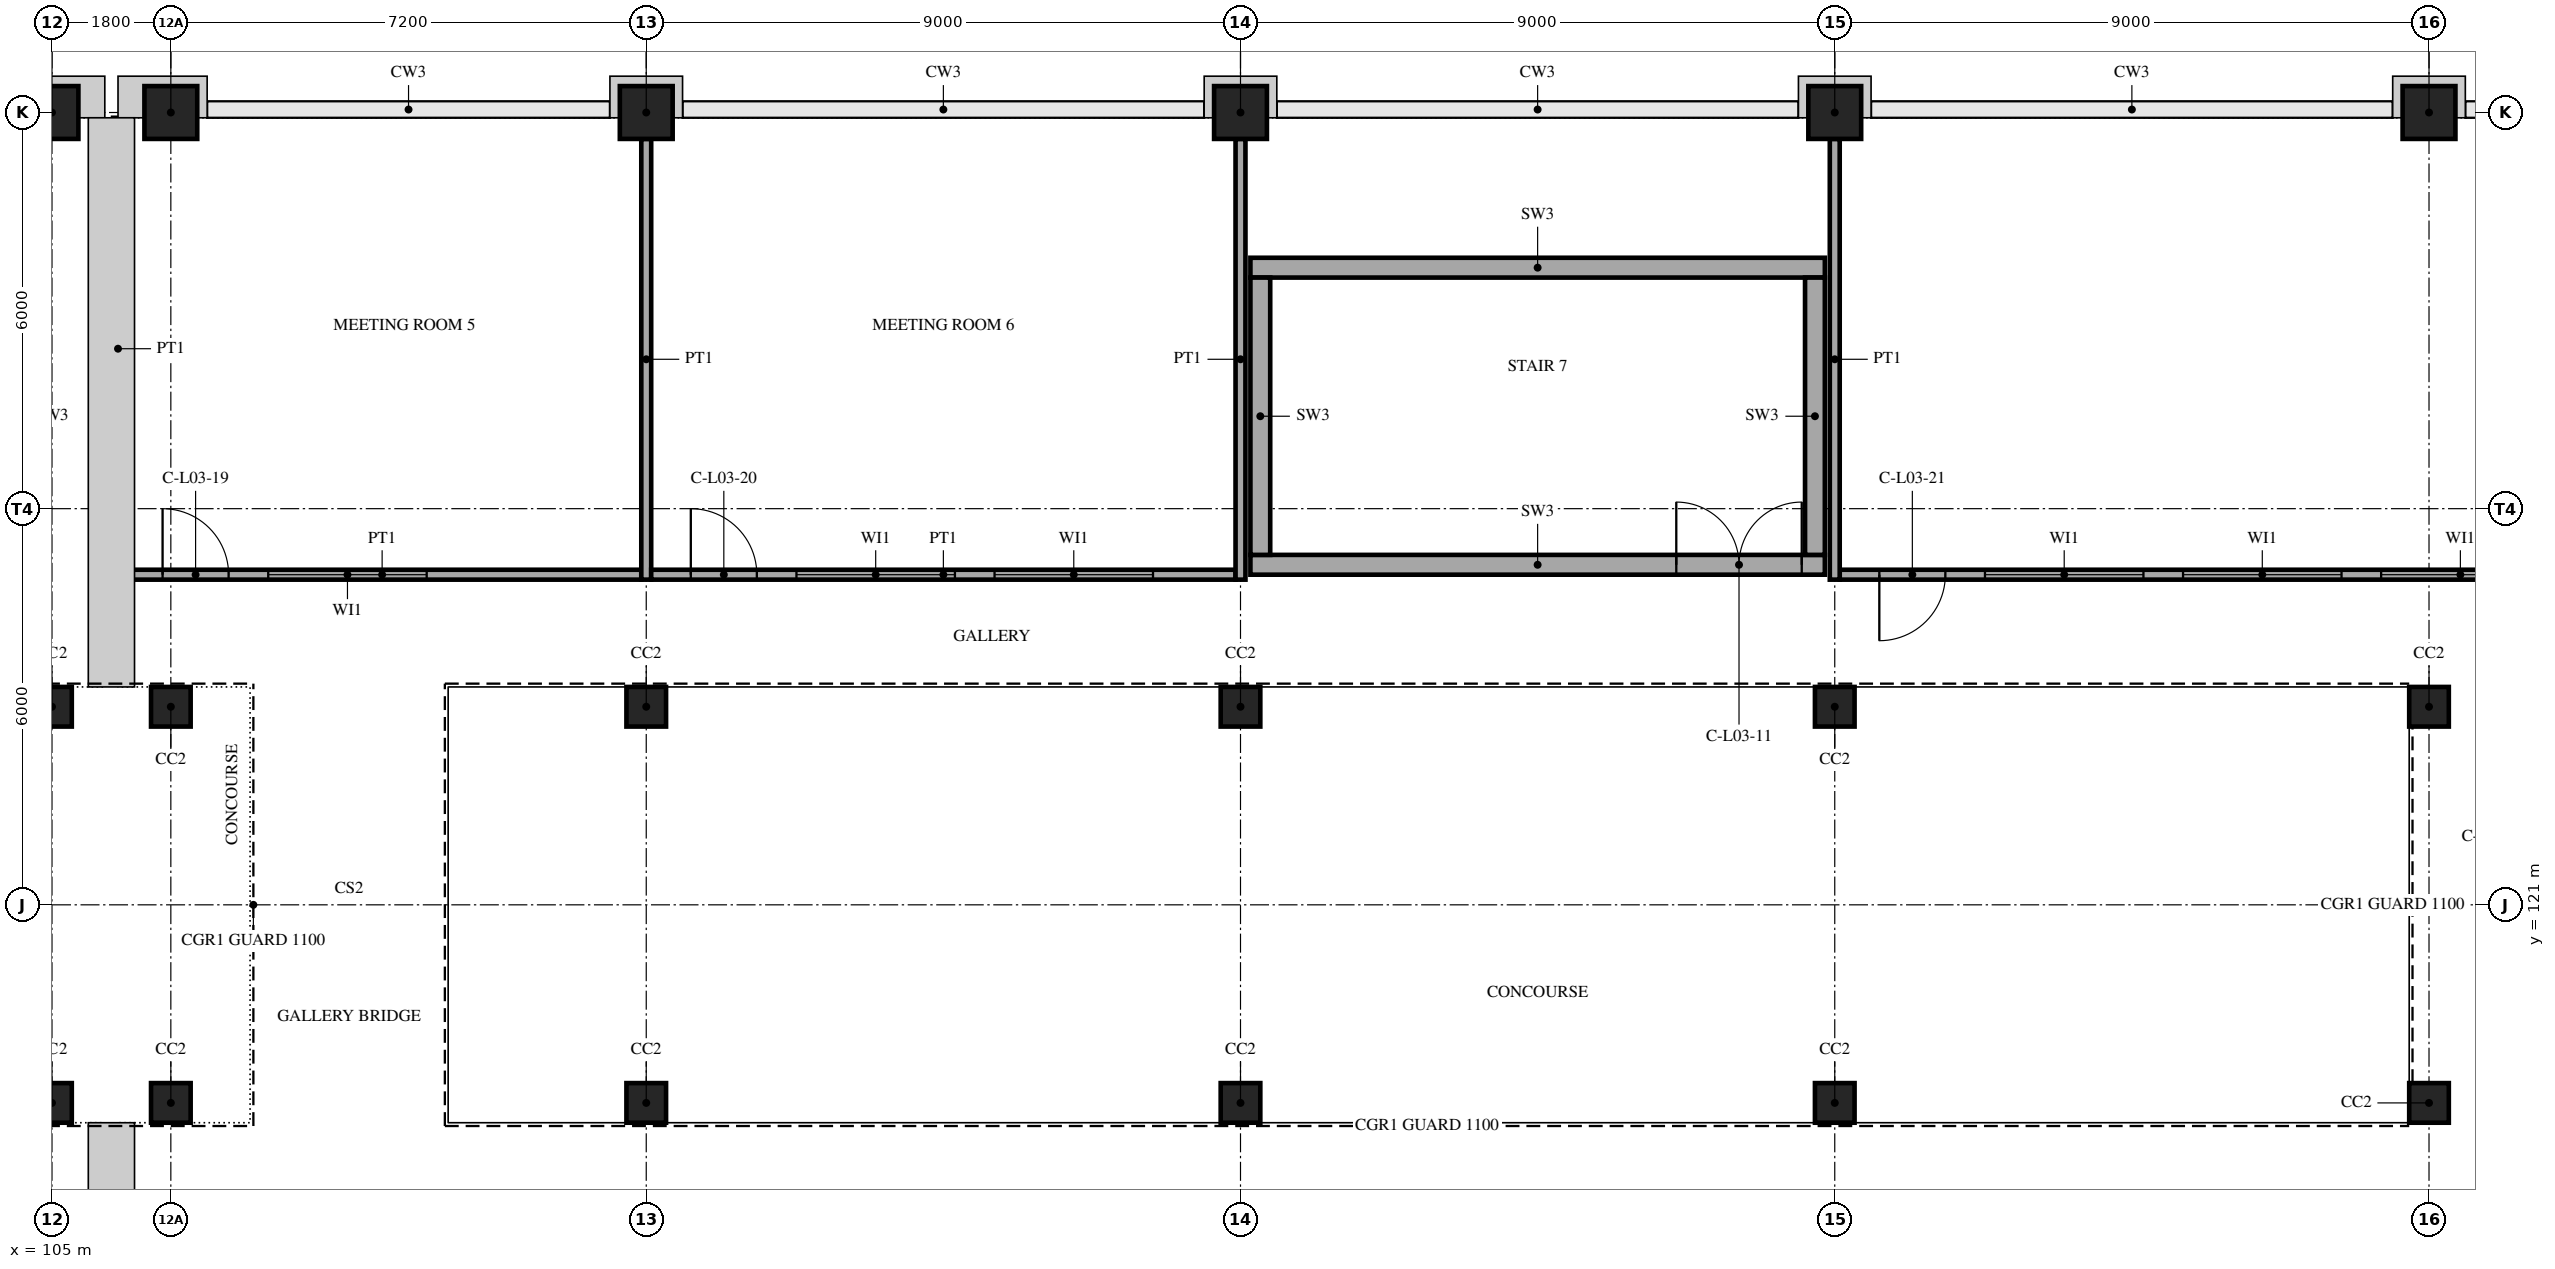
"""IFC4 building model, lengths in metres.
Left out: names, types, materials, properties, quantities, classifications, styles, units other than length and angle.
Written with IfcOpenShell. Run it as: python <this file> out.ifc"""

import sys

from ifc_helpers import new_model, si_unit, direction, frame, frame_2d, origin, origin_2d, place, context, subcontext, project, spatial, rectangle, extrude, element, fill, save


model = new_model("IFC4")
c1 = context("Model", 3, precision=1e-05, world=origin(), true_north=direction((0.0, 1.0)))
c2 = subcontext(c1, "Body", "Model", "MODEL_VIEW")
j1 = project(units=[si_unit("LENGTHUNIT", "METRE"), si_unit("PLANEANGLEUNIT", "RADIAN")], contexts=[c1])
p1 = place(None, origin())
s1 = spatial("IfcSite", under=j1, at=p1, CompositionType="ELEMENT")
p2 = place(p1, origin())
s2 = spatial("IfcBuilding", under=s1, at=p2, CompositionType="ELEMENT")
p3 = place(p2, frame((0.0, 0.0, 15.0)))
s3 = spatial("IfcBuildingStorey", under=s2, at=p3, CompositionType="ELEMENT", Elevation=15.0)
for number, where, z_axis, x_axis in (
    (1, (105.0, 118.0, 0.0), (0.0, 0.0, 1.0), (1.0, 0.0, 0.0)),
    (2, (105.0, 124.0, 0.0), (0.0, 0.0, 1.0), (1.0, 0.0, 0.0)),
):
    element("IfcColumn", number, at=place(p3, frame(where, z_axis=z_axis, x_axis=x_axis)), inside=s3, PredefinedType="COLUMN", context=c2, shape_type="SweptSolid", body=[
        extrude(rectangle(XDim=0.6, YDim=0.6, at=origin_2d()), origin(), (0.0, 0.0, 1.0), 4.2),
    ])
p4 = place(p3, frame((105.0, 133.0, 0.0), z_axis=(0.0, 0.0, 1.0), x_axis=(1.0, 0.0, 0.0)))
e3 = element("IfcColumn", 3, at=p4, inside=s3, PredefinedType="COLUMN", context=c2, shape_type="SweptSolid", body=[
    extrude(rectangle(XDim=0.8, YDim=0.8, at=origin_2d()), origin(), (0.0, 0.0, 1.0), 4.2),
])
for number, where, z_axis, x_axis in (
    (4, (106.8, 118.0, 0.0), (0.0, 0.0, 1.0), (1.0, 0.0, 0.0)),
    (5, (106.8, 124.0, 0.0), (0.0, 0.0, 1.0), (1.0, 0.0, 0.0)),
):
    element("IfcColumn", number, at=place(p3, frame(where, z_axis=z_axis, x_axis=x_axis)), inside=s3, PredefinedType="COLUMN", context=c2, shape_type="SweptSolid", body=[
        extrude(rectangle(XDim=0.6, YDim=0.6, at=origin_2d()), origin(), (0.0, 0.0, 1.0), 4.2),
    ])
p5 = place(p3, frame((106.8, 133.0, 0.0), z_axis=(0.0, 0.0, 1.0), x_axis=(1.0, 0.0, 0.0)))
e6 = element("IfcColumn", 6, at=p5, inside=s3, PredefinedType="COLUMN", context=c2, shape_type="SweptSolid", body=[
    extrude(rectangle(XDim=0.8, YDim=0.8, at=origin_2d()), origin(), (0.0, 0.0, 1.0), 4.2),
])
for number, where, z_axis, x_axis in (
    (7, (114.0, 118.0, 0.0), (0.0, 0.0, 1.0), (1.0, 0.0, 0.0)),
    (8, (114.0, 124.0, 0.0), (0.0, 0.0, 1.0), (1.0, 0.0, 0.0)),
):
    element("IfcColumn", number, at=place(p3, frame(where, z_axis=z_axis, x_axis=x_axis)), inside=s3, PredefinedType="COLUMN", context=c2, shape_type="SweptSolid", body=[
        extrude(rectangle(XDim=0.6, YDim=0.6, at=origin_2d()), origin(), (0.0, 0.0, 1.0), 4.2),
    ])
p6 = place(p3, frame((114.0, 133.0, 0.0), z_axis=(0.0, 0.0, 1.0), x_axis=(1.0, 0.0, 0.0)))
e9 = element("IfcColumn", 9, at=p6, inside=s3, PredefinedType="COLUMN", context=c2, shape_type="SweptSolid", body=[
    extrude(rectangle(XDim=0.8, YDim=0.8, at=origin_2d()), origin(), (0.0, 0.0, 1.0), 4.2),
])
for number, where, z_axis, x_axis in (
    (10, (123.0, 118.0, 0.0), (0.0, 0.0, 1.0), (1.0, 0.0, 0.0)),
    (11, (123.0, 124.0, 0.0), (0.0, 0.0, 1.0), (1.0, 0.0, 0.0)),
):
    element("IfcColumn", number, at=place(p3, frame(where, z_axis=z_axis, x_axis=x_axis)), inside=s3, PredefinedType="COLUMN", context=c2, shape_type="SweptSolid", body=[
        extrude(rectangle(XDim=0.6, YDim=0.6, at=origin_2d()), origin(), (0.0, 0.0, 1.0), 4.2),
    ])
p7 = place(p3, frame((123.0, 133.0, 0.0), z_axis=(0.0, 0.0, 1.0), x_axis=(1.0, 0.0, 0.0)))
e12 = element("IfcColumn", 12, at=p7, inside=s3, PredefinedType="COLUMN", context=c2, shape_type="SweptSolid", body=[
    extrude(rectangle(XDim=0.8, YDim=0.8, at=origin_2d()), origin(), (0.0, 0.0, 1.0), 4.2),
])
for number, where, z_axis, x_axis in (
    (13, (132.0, 118.0, 0.0), (0.0, 0.0, 1.0), (1.0, 0.0, 0.0)),
    (14, (132.0, 124.0, 0.0), (0.0, 0.0, 1.0), (1.0, 0.0, 0.0)),
):
    element("IfcColumn", number, at=place(p3, frame(where, z_axis=z_axis, x_axis=x_axis)), inside=s3, PredefinedType="COLUMN", context=c2, shape_type="SweptSolid", body=[
        extrude(rectangle(XDim=0.6, YDim=0.6, at=origin_2d()), origin(), (0.0, 0.0, 1.0), 4.2),
    ])
p8 = place(p3, frame((132.0, 133.0, 0.0), z_axis=(0.0, 0.0, 1.0), x_axis=(1.0, 0.0, 0.0)))
e15 = element("IfcColumn", 15, at=p8, inside=s3, PredefinedType="COLUMN", context=c2, shape_type="SweptSolid", body=[
    extrude(rectangle(XDim=0.8, YDim=0.8, at=origin_2d()), origin(), (0.0, 0.0, 1.0), 4.2),
])
for number, where, z_axis, x_axis in (
    (16, (141.0, 118.0, 0.0), (0.0, 0.0, 1.0), (1.0, 0.0, 0.0)),
    (17, (141.0, 124.0, 0.0), (0.0, 0.0, 1.0), (1.0, 0.0, 0.0)),
):
    element("IfcColumn", number, at=place(p3, frame(where, z_axis=z_axis, x_axis=x_axis)), inside=s3, PredefinedType="COLUMN", context=c2, shape_type="SweptSolid", body=[
        extrude(rectangle(XDim=0.6, YDim=0.6, at=origin_2d()), origin(), (0.0, 0.0, 1.0), 4.2),
    ])
p9 = place(p3, frame((141.0, 133.0, 0.0), z_axis=(0.0, 0.0, 1.0), x_axis=(1.0, 0.0, 0.0)))
e18 = element("IfcColumn", 18, at=p9, inside=s3, PredefinedType="COLUMN", context=c2, shape_type="SweptSolid", body=[
    extrude(rectangle(XDim=0.8, YDim=0.8, at=origin_2d()), origin(), (0.0, 0.0, 1.0), 4.2),
])
p10 = place(p3, frame((123.15, 126.15, 0.0), z_axis=(0.0, 0.0, 1.0), x_axis=(1.0, 0.0, 0.0)))
e19 = element("IfcWall", 19, at=p10, inside=s3, PredefinedType="SHEAR", context=c2, shape_type="SweptSolid", body=[
    extrude(rectangle(XDim=8.7, YDim=0.3, at=frame_2d((4.35, 0.0))), origin(), (0.0, 0.0, 1.0), 4.2),
])
p11 = place(p10, frame((6.45, 0.0, 0.0)))
e20 = element("IfcOpeningElement", 20, at=p11, cuts=e19, PredefinedType="OPENING", context=c2, shape_type="SweptSolid", body=[
    extrude(rectangle(XDim=1.9, YDim=2.1, at=frame_2d((0.95, 1.05))), frame((0.0, 0.16, 0.0), z_axis=(0.0, -1.0, 0.0), x_axis=(1.0, 0.0, 0.0)), (0.0, 0.0, 1.0), 0.32),
])
p12 = place(p3, frame((123.15, 130.65, 0.0), z_axis=(0.0, 0.0, 1.0), x_axis=(1.0, 0.0, 0.0)))
e21 = element("IfcWall", 21, at=p12, inside=s3, PredefinedType="SHEAR", context=c2, shape_type="SweptSolid", body=[
    extrude(rectangle(XDim=8.7, YDim=0.3, at=frame_2d((4.35, 0.0))), origin(), (0.0, 0.0, 1.0), 4.2),
])
for number, where, z_axis, x_axis in (
    (22, (123.3, 126.3, 0.0), (0.0, 0.0, 1.0), (0.0, 1.0, 0.0)),
    (23, (131.7, 126.3, 0.0), (0.0, 0.0, 1.0), (0.0, 1.0, 0.0)),
):
    element("IfcWall", number, at=place(p3, frame(where, z_axis=z_axis, x_axis=x_axis)), inside=s3, PredefinedType="SHEAR", context=c2, shape_type="SweptSolid", body=[
        extrude(rectangle(XDim=4.2, YDim=0.3, at=frame_2d((2.1, 0.0))), origin(), (0.0, 0.0, 1.0), 4.2),
    ])
p13 = place(p3, frame((106.075, 126.0, 0.0), z_axis=(0.0, 0.0, 1.0), x_axis=(1.0, 0.0, 0.0)))
e24 = element("IfcWall", 24, at=p13, inside=s3, PredefinedType="PARTITIONING", context=c2, shape_type="SweptSolid", body=[
    extrude(rectangle(XDim=7.85, YDim=0.15, at=frame_2d((3.925, 0.0))), origin(), (0.0, 0.0, 1.0), 4.2),
])
p14 = place(p13, frame((0.6, 0.0, 0.0)))
e25 = element("IfcOpeningElement", 25, at=p14, cuts=e24, PredefinedType="OPENING", context=c2, shape_type="SweptSolid", body=[
    extrude(rectangle(XDim=1.0, YDim=2.1, at=frame_2d((0.5, 1.05))), frame((0.0, 0.085, 0.0), z_axis=(0.0, -1.0, 0.0), x_axis=(1.0, 0.0, 0.0)), (0.0, 0.0, 1.0), 0.17),
])
p15 = place(p13, frame((2.2, 0.0, 0.9)))
e26 = element("IfcOpeningElement", 26, at=p15, cuts=e24, PredefinedType="OPENING", context=c2, shape_type="SweptSolid", body=[
    extrude(rectangle(XDim=2.4, YDim=1.5, at=frame_2d((1.2, 0.75))), frame((0.0, 0.085, 0.0), z_axis=(0.0, -1.0, 0.0), x_axis=(1.0, 0.0, 0.0)), (0.0, 0.0, 1.0), 0.17),
])
p16 = place(p3, frame((106.0, 125.925, 0.0), z_axis=(0.0, 0.0, 1.0), x_axis=(0.0, 1.0, 0.0)))
e27 = element("IfcWall", 27, at=p16, inside=s3, PredefinedType="PARTITIONING", context=c2, shape_type="SweptSolid", body=[
    extrude(rectangle(XDim=6.995, YDim=0.15, at=frame_2d((3.498, 0.0))), origin(), (0.0, 0.0, 1.0), 4.2),
])
p17 = place(p3, frame((114.0, 125.925, 0.0), z_axis=(0.0, 0.0, 1.0), x_axis=(0.0, 1.0, 0.0)))
e28 = element("IfcWall", 28, at=p17, inside=s3, PredefinedType="PARTITIONING", context=c2, shape_type="SweptSolid", body=[
    extrude(rectangle(XDim=6.675, YDim=0.15, at=frame_2d((3.337, 0.0))), origin(), (0.0, 0.0, 1.0), 4.2),
])
p18 = place(p3, frame((114.075, 126.0, 0.0), z_axis=(0.0, 0.0, 1.0), x_axis=(1.0, 0.0, 0.0)))
e29 = element("IfcWall", 29, at=p18, inside=s3, PredefinedType="PARTITIONING", context=c2, shape_type="SweptSolid", body=[
    extrude(rectangle(XDim=8.85, YDim=0.15, at=frame_2d((4.425, 0.0))), origin(), (0.0, 0.0, 1.0), 4.2),
])
p19 = place(p18, frame((0.6, 0.0, 0.0)))
e30 = element("IfcOpeningElement", 30, at=p19, cuts=e29, PredefinedType="OPENING", context=c2, shape_type="SweptSolid", body=[
    extrude(rectangle(XDim=1.0, YDim=2.1, at=frame_2d((0.5, 1.05))), frame((0.0, 0.085, 0.0), z_axis=(0.0, -1.0, 0.0), x_axis=(1.0, 0.0, 0.0)), (0.0, 0.0, 1.0), 0.17),
])
p20 = place(p18, frame((2.2, 0.0, 0.9)))
e31 = element("IfcOpeningElement", 31, at=p20, cuts=e29, PredefinedType="OPENING", context=c2, shape_type="SweptSolid", body=[
    extrude(rectangle(XDim=2.4, YDim=1.5, at=frame_2d((1.2, 0.75))), frame((0.0, 0.085, 0.0), z_axis=(0.0, -1.0, 0.0), x_axis=(1.0, 0.0, 0.0)), (0.0, 0.0, 1.0), 0.17),
])
p21 = place(p18, frame((5.2, 0.0, 0.9)))
e32 = element("IfcOpeningElement", 32, at=p21, cuts=e29, PredefinedType="OPENING", context=c2, shape_type="SweptSolid", body=[
    extrude(rectangle(XDim=2.4, YDim=1.5, at=frame_2d((1.2, 0.75))), frame((0.0, 0.085, 0.0), z_axis=(0.0, -1.0, 0.0), x_axis=(1.0, 0.0, 0.0)), (0.0, 0.0, 1.0), 0.17),
])
p22 = place(p3, frame((123.0, 125.925, 0.0), z_axis=(0.0, 0.0, 1.0), x_axis=(0.0, 1.0, 0.0)))
e33 = element("IfcWall", 33, at=p22, inside=s3, PredefinedType="PARTITIONING", context=c2, shape_type="SweptSolid", body=[
    extrude(rectangle(XDim=6.675, YDim=0.15, at=frame_2d((3.337, 0.0))), origin(), (0.0, 0.0, 1.0), 4.2),
])
p23 = place(p3, frame((132.075, 126.0, 0.0), z_axis=(0.0, 0.0, 1.0), x_axis=(1.0, 0.0, 0.0)))
e34 = element("IfcWall", 34, at=p23, inside=s3, PredefinedType="PARTITIONING", context=c2, shape_type="SweptSolid", body=[
    extrude(rectangle(XDim=26.85, YDim=0.15, at=frame_2d((13.425, 0.0))), origin(), (0.0, 0.0, 1.0), 4.2),
])
p24 = place(p23, frame((0.6, 0.0, 0.0)))
e35 = element("IfcOpeningElement", 35, at=p24, cuts=e34, PredefinedType="OPENING", context=c2, shape_type="SweptSolid", body=[
    extrude(rectangle(XDim=1.0, YDim=2.1, at=frame_2d((0.5, 1.05))), frame((0.0, 0.085, 0.0), z_axis=(0.0, -1.0, 0.0), x_axis=(1.0, 0.0, 0.0)), (0.0, 0.0, 1.0), 0.17),
])
p25 = place(p23, frame((2.2, 0.0, 0.9)))
e36 = element("IfcOpeningElement", 36, at=p25, cuts=e34, PredefinedType="OPENING", context=c2, shape_type="SweptSolid", body=[
    extrude(rectangle(XDim=2.4, YDim=1.5, at=frame_2d((1.2, 0.75))), frame((0.0, 0.085, 0.0), z_axis=(0.0, -1.0, 0.0), x_axis=(1.0, 0.0, 0.0)), (0.0, 0.0, 1.0), 0.17),
])
p26 = place(p23, frame((5.2, 0.0, 0.9)))
e37 = element("IfcOpeningElement", 37, at=p26, cuts=e34, PredefinedType="OPENING", context=c2, shape_type="SweptSolid", body=[
    extrude(rectangle(XDim=2.4, YDim=1.5, at=frame_2d((1.2, 0.75))), frame((0.0, 0.085, 0.0), z_axis=(0.0, -1.0, 0.0), x_axis=(1.0, 0.0, 0.0)), (0.0, 0.0, 1.0), 0.17),
])
p27 = place(p23, frame((8.2, 0.0, 0.9)))
e38 = element("IfcOpeningElement", 38, at=p27, cuts=e34, PredefinedType="OPENING", context=c2, shape_type="SweptSolid", body=[
    extrude(rectangle(XDim=2.4, YDim=1.5, at=frame_2d((1.2, 0.75))), frame((0.0, 0.085, 0.0), z_axis=(0.0, -1.0, 0.0), x_axis=(1.0, 0.0, 0.0)), (0.0, 0.0, 1.0), 0.17),
])
p28 = place(p3, frame((132.0, 125.925, 0.0), z_axis=(0.0, 0.0, 1.0), x_axis=(0.0, 1.0, 0.0)))
e39 = element("IfcWall", 39, at=p28, inside=s3, PredefinedType="PARTITIONING", context=c2, shape_type="SweptSolid", body=[
    extrude(rectangle(XDim=6.675, YDim=0.15, at=frame_2d((3.337, 0.0))), origin(), (0.0, 0.0, 1.0), 4.2),
])
p29 = place(p11, origin())
e40 = element("IfcDoor", 40, at=p29, inside=s3, OperationType="DOUBLE_DOOR_SINGLE_SWING", PredefinedType="NOTDEFINED", context=c2, shape_type="SweptSolid", body=[
    extrude(rectangle(XDim=1.9, YDim=2.1, at=frame_2d((0.95, 1.05))), frame((0.0, 0.025, 0.0), z_axis=(0.0, -1.0, 0.0), x_axis=(1.0, 0.0, 0.0)), (0.0, 0.0, 1.0), 0.05),
])
fill(e20, e40)
p30 = place(p14, origin())
e41 = element("IfcDoor", 41, at=p30, inside=s3, OperationType="SINGLE_SWING_LEFT", PredefinedType="NOTDEFINED", context=c2, shape_type="SweptSolid", body=[
    extrude(rectangle(XDim=1.0, YDim=2.1, at=frame_2d((0.5, 1.05))), frame((0.0, 0.025, 0.0), z_axis=(0.0, -1.0, 0.0), x_axis=(1.0, 0.0, 0.0)), (0.0, 0.0, 1.0), 0.05),
])
fill(e25, e41)
p31 = place(p15, origin())
e42 = element("IfcWindow", 42, at=p31, inside=s3, PartitioningType="SINGLE_PANEL", PredefinedType="WINDOW", context=c2, shape_type="SweptSolid", body=[
    extrude(rectangle(XDim=2.4, YDim=1.5, at=frame_2d((1.2, 0.75))), frame((0.0, 0.03, 0.0), z_axis=(0.0, -1.0, 0.0), x_axis=(1.0, 0.0, 0.0)), (0.0, 0.0, 1.0), 0.06),
])
fill(e26, e42)
p32 = place(p19, origin())
e43 = element("IfcDoor", 43, at=p32, inside=s3, OperationType="SINGLE_SWING_LEFT", PredefinedType="NOTDEFINED", context=c2, shape_type="SweptSolid", body=[
    extrude(rectangle(XDim=1.0, YDim=2.1, at=frame_2d((0.5, 1.05))), frame((0.0, 0.025, 0.0), z_axis=(0.0, -1.0, 0.0), x_axis=(1.0, 0.0, 0.0)), (0.0, 0.0, 1.0), 0.05),
])
fill(e30, e43)
p33 = place(p20, origin())
e44 = element("IfcWindow", 44, at=p33, inside=s3, PartitioningType="SINGLE_PANEL", PredefinedType="WINDOW", context=c2, shape_type="SweptSolid", body=[
    extrude(rectangle(XDim=2.4, YDim=1.5, at=frame_2d((1.2, 0.75))), frame((0.0, 0.03, 0.0), z_axis=(0.0, -1.0, 0.0), x_axis=(1.0, 0.0, 0.0)), (0.0, 0.0, 1.0), 0.06),
])
fill(e31, e44)
p34 = place(p21, origin())
e45 = element("IfcWindow", 45, at=p34, inside=s3, PartitioningType="SINGLE_PANEL", PredefinedType="WINDOW", context=c2, shape_type="SweptSolid", body=[
    extrude(rectangle(XDim=2.4, YDim=1.5, at=frame_2d((1.2, 0.75))), frame((0.0, 0.03, 0.0), z_axis=(0.0, -1.0, 0.0), x_axis=(1.0, 0.0, 0.0)), (0.0, 0.0, 1.0), 0.06),
])
fill(e32, e45)
p35 = place(p24, frame((1.0, 0.0, 0.0), z_axis=(0.0, 0.0, 1.0), x_axis=(-1.0, 0.0, 0.0)))
e46 = element("IfcDoor", 46, at=p35, inside=s3, OperationType="SINGLE_SWING_RIGHT", PredefinedType="NOTDEFINED", context=c2, shape_type="SweptSolid", body=[
    extrude(rectangle(XDim=1.0, YDim=2.1, at=frame_2d((0.5, 1.05))), frame((0.0, 0.025, 0.0), z_axis=(0.0, -1.0, 0.0), x_axis=(1.0, 0.0, 0.0)), (0.0, 0.0, 1.0), 0.05),
])
fill(e35, e46)
p36 = place(p25, origin())
e47 = element("IfcWindow", 47, at=p36, inside=s3, PartitioningType="SINGLE_PANEL", PredefinedType="WINDOW", context=c2, shape_type="SweptSolid", body=[
    extrude(rectangle(XDim=2.4, YDim=1.5, at=frame_2d((1.2, 0.75))), frame((0.0, 0.03, 0.0), z_axis=(0.0, -1.0, 0.0), x_axis=(1.0, 0.0, 0.0)), (0.0, 0.0, 1.0), 0.06),
])
fill(e36, e47)
p37 = place(p26, origin())
e48 = element("IfcWindow", 48, at=p37, inside=s3, PartitioningType="SINGLE_PANEL", PredefinedType="WINDOW", context=c2, shape_type="SweptSolid", body=[
    extrude(rectangle(XDim=2.4, YDim=1.5, at=frame_2d((1.2, 0.75))), frame((0.0, 0.03, 0.0), z_axis=(0.0, -1.0, 0.0), x_axis=(1.0, 0.0, 0.0)), (0.0, 0.0, 1.0), 0.06),
])
fill(e37, e48)
p38 = place(p27, origin())
e49 = element("IfcWindow", 49, at=p38, inside=s3, PartitioningType="SINGLE_PANEL", PredefinedType="WINDOW", context=c2, shape_type="SweptSolid", body=[
    extrude(rectangle(XDim=2.4, YDim=1.5, at=frame_2d((1.2, 0.75))), frame((0.0, 0.03, 0.0), z_axis=(0.0, -1.0, 0.0), x_axis=(1.0, 0.0, 0.0)), (0.0, 0.0, 1.0), 0.06),
])
fill(e38, e49)
save(model, sys.argv[1])
